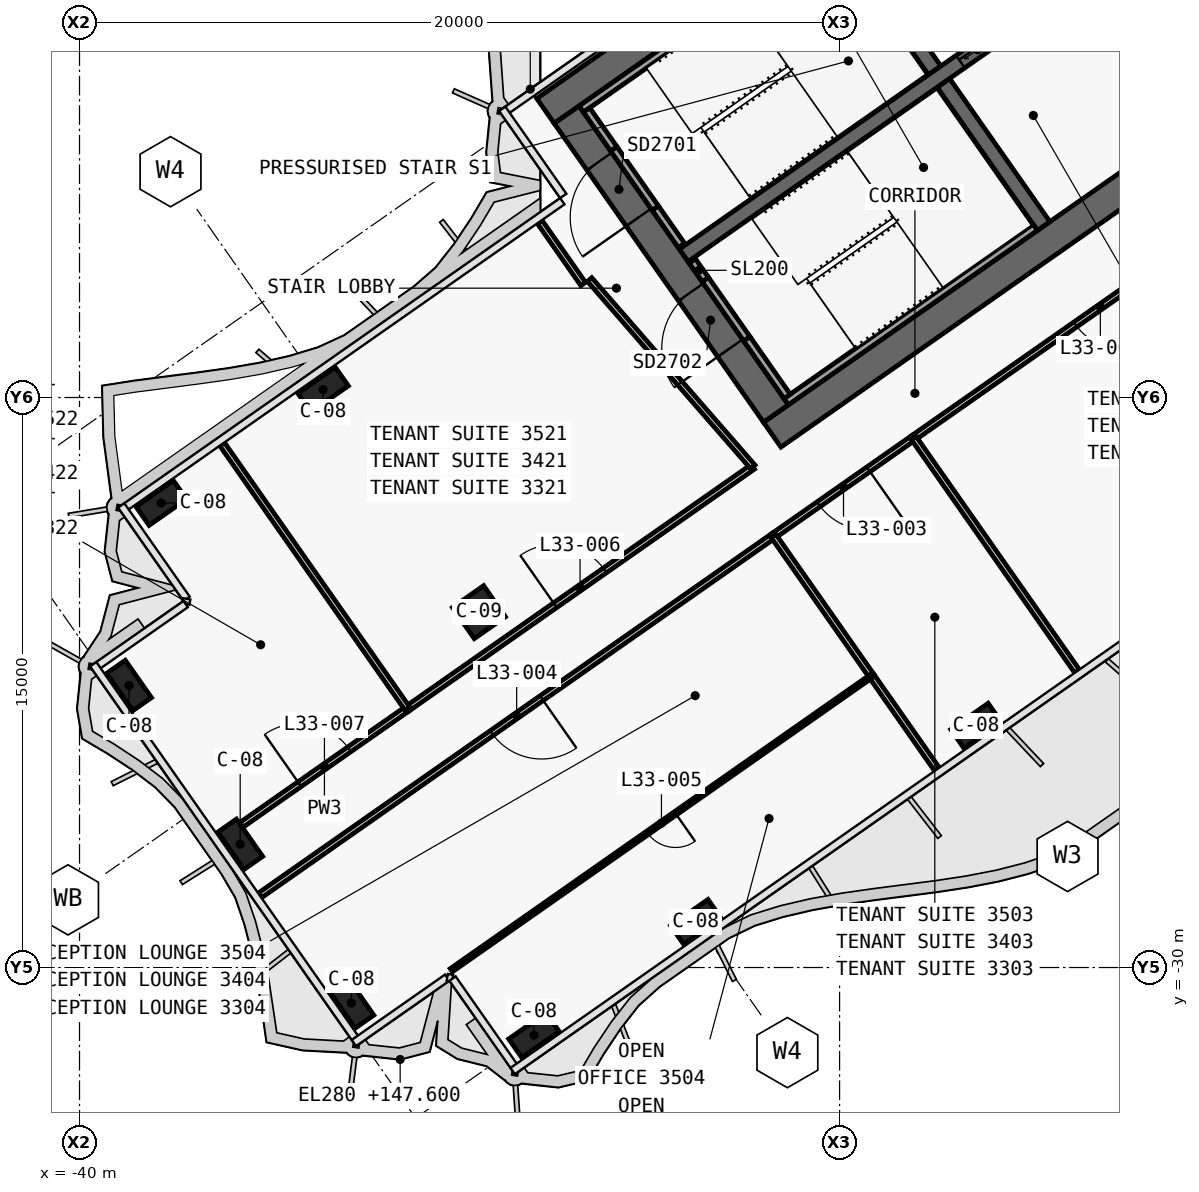
"""IFC4 building model, lengths in metres.
Left out: names, types, materials, properties, quantities, classifications, styles, units other than length and angle.
Written with IfcOpenShell. Run it as: python <this file> out.ifc"""

import sys

from ifc_helpers import new_model, si_unit, direction, frame, frame_2d, origin, origin_2d, place, context, subcontext, project, spatial, polyline, rectangle, outline, extrude, element, fill, save


model = new_model("IFC4")
c1 = context("Model", 3, precision=1e-05, world=origin(), true_north=direction((0.0, 1.0)))
c2 = subcontext(c1, "Body", "Model", "MODEL_VIEW")
j1 = project(units=[si_unit("LENGTHUNIT", "METRE"), si_unit("PLANEANGLEUNIT", "RADIAN")], contexts=[c1])
p1 = place(None, origin())
s1 = spatial("IfcSite", under=j1, at=p1, CompositionType="ELEMENT")
p2 = place(p1, origin())
s2 = spatial("IfcBuilding", under=s1, at=p2, CompositionType="ELEMENT")
p3 = place(p2, frame((0.0, 0.0, 147.6)))
s3 = spatial("IfcBuildingStorey", under=s2, at=p3, CompositionType="ELEMENT", Elevation=147.6)
p4 = place(p3, frame((0.029, 11.984, 0.0), z_axis=(0.0, 0.0, 1.0), x_axis=(-0.819151382952, -0.573577380837, 0.0)))
e1 = element("IfcWall", 1, at=p4, inside=s3, PredefinedType="SHEAR", context=c2, shape_type="SweptSolid", body=[
    extrude(outline(polyline([(33.898, 0.4), (0.56, 0.4), (-0.0, -0.4), (33.898, -0.4), (33.898, 0.4)])), origin(), (0.0, 0.0, 1.0), 3.9),
])
p5 = place(p3, frame((0.029, -0.712, 0.0), z_axis=(0.0, 0.0, 1.0), x_axis=(-0.819151758019, -0.573576845187, 0.0)))
e2 = element("IfcWall", 2, at=p5, inside=s3, PredefinedType="SHEAR", context=c2, shape_type="SweptSolid", body=[
    extrude(outline(polyline([(26.616, 0.4), (0.56, 0.4), (-0.0, -0.4), (26.616, -0.4), (26.616, 0.4)])), origin(), (0.0, 0.0, 1.0), 3.9),
])
p6 = place(p5, frame((2.966, 0.0, 0.0)))
e3 = element("IfcOpeningElement", 3, at=p6, cuts=e2, PredefinedType="OPENING", context=c2, shape_type="SweptSolid", body=[
    extrude(rectangle(XDim=2.4, YDim=2.1, at=frame_2d((1.2, 1.05))), frame((0.0, 0.41, 0.0), z_axis=(0.0, -1.0, 0.0), x_axis=(1.0, 0.0, 0.0)), (0.0, 0.0, 1.0), 0.82),
])
p7 = place(p5, frame((11.916, 0.0, 0.0)))
e4 = element("IfcOpeningElement", 4, at=p7, cuts=e2, PredefinedType="OPENING", context=c2, shape_type="SweptSolid", body=[
    extrude(rectangle(XDim=2.4, YDim=2.1, at=frame_2d((1.2, 1.05))), frame((0.0, 0.41, 0.0), z_axis=(0.0, -1.0, 0.0), x_axis=(1.0, 0.0, 0.0)), (0.0, 0.0, 1.0), 0.82),
])
p8 = place(p3, frame((-21.675, -15.421, 0.0), z_axis=(0.0, 0.0, 1.0), x_axis=(-0.573581815061, 0.819148278049, 0.0)))
e5 = element("IfcWall", 5, at=p8, inside=s3, PredefinedType="SHEAR", context=c2, shape_type="SweptSolid", body=[
    extrude(outline(polyline([(0.0, 0.4), (0.0, -0.4), (9.6, -0.4), (9.6, 0.4), (0.0, 0.4)])), origin(), (0.0, 0.0, 1.0), 3.9),
])
p9 = place(p8, frame((6.3, 0.0, 0.0)))
e6 = element("IfcOpeningElement", 6, at=p9, cuts=e5, PredefinedType="OPENING", context=c2, shape_type="SweptSolid", body=[
    extrude(rectangle(XDim=1.8, YDim=2.1, at=frame_2d((0.9, 1.05))), frame((0.0, 0.41, 0.0), z_axis=(0.0, -1.0, 0.0), x_axis=(1.0, 0.0, 0.0)), (0.0, 0.0, 1.0), 0.82),
])
p10 = place(p8, frame((2.1, 0.0, 0.0)))
e7 = element("IfcOpeningElement", 7, at=p10, cuts=e5, PredefinedType="OPENING", context=c2, shape_type="SweptSolid", body=[
    extrude(rectangle(XDim=1.8, YDim=2.1, at=frame_2d((0.9, 1.05))), frame((0.0, 0.41, 0.0), z_axis=(0.0, -1.0, 0.0), x_axis=(1.0, 0.0, 0.0)), (0.0, 0.0, 1.0), 0.82),
])
p11 = place(p3, frame((-14.63, -10.488, 0.0), z_axis=(0.0, 0.0, 1.0), x_axis=(-0.573611936273, 0.819127185829, 0.0)))
e8 = element("IfcWall", 8, at=p11, inside=s3, PredefinedType="SHEAR", context=c2, shape_type="SweptSolid", body=[
    extrude(outline(polyline([(4.6, 0.2), (0.0, 0.2), (0.0, -0.2), (4.6, -0.2), (4.6, 0.2)])), origin(), (0.0, 0.0, 1.0), 3.9),
])
p12 = place(p3, frame((-17.498, -6.392, 0.0), z_axis=(0.0, 0.0, 1.0), x_axis=(-0.573611936273, 0.819127185829, 0.0)))
e9 = element("IfcWall", 9, at=p12, inside=s3, PredefinedType="SHEAR", context=c2, shape_type="SweptSolid", body=[
    extrude(outline(polyline([(4.6, -0.2), (4.6, 0.2), (0.0, 0.2), (0.0, -0.2), (4.6, -0.2)])), origin(), (0.0, 0.0, 1.0), 3.9),
])
p13 = place(p3, frame((-2.638, 3.768, 0.0), z_axis=(0.0, 0.0, 1.0), x_axis=(-0.81915267502, -0.573575535572, 0.0)))
e10 = element("IfcWall", 10, at=p13, inside=s3, PredefinedType="SHEAR", context=c2, shape_type="SweptSolid", body=[
    extrude(outline(polyline([(26.2, 0.2), (0.0, 0.2), (0.0, -0.2), (26.2, -0.2), (26.2, 0.2)])), origin(), (0.0, 0.0, 1.0), 3.9),
])
p14 = place(p13, frame((1.169, 0.0, 0.0)))
e11 = element("IfcOpeningElement", 11, at=p14, cuts=e10, PredefinedType="OPENING", context=c2, shape_type="SweptSolid", body=[
    extrude(rectangle(XDim=1.1, YDim=2.1, at=frame_2d((0.55, 1.05))), frame((0.0, 0.21, 0.0), z_axis=(0.0, -1.0, 0.0), x_axis=(1.0, 0.0, 0.0)), (0.0, 0.0, 1.0), 0.42),
])
p15 = place(p13, frame((3.206, 0.0, 0.0)))
e12 = element("IfcOpeningElement", 12, at=p15, cuts=e10, PredefinedType="OPENING", context=c2, shape_type="SweptSolid", body=[
    extrude(rectangle(XDim=1.1, YDim=2.1, at=frame_2d((0.55, 1.05))), frame((0.0, 0.21, 0.0), z_axis=(0.0, -1.0, 0.0), x_axis=(1.0, 0.0, 0.0)), (0.0, 0.0, 1.0), 0.42),
])
p16 = place(p13, frame((5.244, 0.0, 0.0)))
e13 = element("IfcOpeningElement", 13, at=p16, cuts=e10, PredefinedType="OPENING", context=c2, shape_type="SweptSolid", body=[
    extrude(rectangle(XDim=1.1, YDim=2.1, at=frame_2d((0.55, 1.05))), frame((0.0, 0.21, 0.0), z_axis=(0.0, -1.0, 0.0), x_axis=(1.0, 0.0, 0.0)), (0.0, 0.0, 1.0), 0.42),
])
p17 = place(p13, frame((7.281, 0.0, 0.0)))
e14 = element("IfcOpeningElement", 14, at=p17, cuts=e10, PredefinedType="OPENING", context=c2, shape_type="SweptSolid", body=[
    extrude(rectangle(XDim=1.1, YDim=2.1, at=frame_2d((0.55, 1.05))), frame((0.0, 0.21, 0.0), z_axis=(0.0, -1.0, 0.0), x_axis=(1.0, 0.0, 0.0)), (0.0, 0.0, 1.0), 0.42),
])
p18 = place(p13, frame((9.688, 0.0, 0.0)))
e15 = element("IfcOpeningElement", 15, at=p18, cuts=e10, PredefinedType="OPENING", context=c2, shape_type="SweptSolid", body=[
    extrude(rectangle(XDim=1.1, YDim=2.1, at=frame_2d((0.55, 1.05))), frame((0.0, 0.21, 0.0), z_axis=(0.0, -1.0, 0.0), x_axis=(1.0, 0.0, 0.0)), (0.0, 0.0, 1.0), 0.42),
])
p19 = place(p13, frame((11.863, 0.0, 0.0)))
e16 = element("IfcOpeningElement", 16, at=p19, cuts=e10, PredefinedType="OPENING", context=c2, shape_type="SweptSolid", body=[
    extrude(rectangle(XDim=1.1, YDim=2.1, at=frame_2d((0.55, 1.05))), frame((0.0, 0.21, 0.0), z_axis=(0.0, -1.0, 0.0), x_axis=(1.0, 0.0, 0.0)), (0.0, 0.0, 1.0), 0.42),
])
p20 = place(p13, frame((14.038, 0.0, 0.0)))
e17 = element("IfcOpeningElement", 17, at=p20, cuts=e10, PredefinedType="OPENING", context=c2, shape_type="SweptSolid", body=[
    extrude(rectangle(XDim=1.1, YDim=2.1, at=frame_2d((0.55, 1.05))), frame((0.0, 0.21, 0.0), z_axis=(0.0, -1.0, 0.0), x_axis=(1.0, 0.0, 0.0)), (0.0, 0.0, 1.0), 0.42),
])
p21 = place(p13, frame((16.212, 0.0, 0.0)))
e18 = element("IfcOpeningElement", 18, at=p21, cuts=e10, PredefinedType="OPENING", context=c2, shape_type="SweptSolid", body=[
    extrude(rectangle(XDim=1.1, YDim=2.1, at=frame_2d((0.55, 1.05))), frame((0.0, 0.21, 0.0), z_axis=(0.0, -1.0, 0.0), x_axis=(1.0, 0.0, 0.0)), (0.0, 0.0, 1.0), 0.42),
])
for number, where, z_axis, x_axis in (
    (19, (-16.41, -23.637, 0.0), (0.0, 0.0, 1.0), (-0.819, -0.574, 0.0)),
    (20, (-23.782, -28.799, 0.0), (0.0, 0.0, 1.0), (-0.819, -0.574, 0.0)),
    (21, (-28.042, -31.782, 0.0), (0.0, 0.0, 1.0), (-0.819, -0.574, 0.0)),
    (22, (-33.591, -14.792, 0.0), (0.0, 0.0, 1.0), (-0.819, -0.574, 0.0)),
    (23, (-37.85, -17.774, 0.0), (0.0, 0.0, 1.0), (-0.819, -0.574, 0.0)),
    (24, (-32.847, -30.935, 0.0), (0.0, 0.0, 1.0), (-0.574, 0.819, 0.0)),
    (25, (-35.772, -26.757, 0.0), (0.0, 0.0, 1.0), (-0.574, 0.819, 0.0)),
    (26, (-38.698, -22.579, 0.0), (0.0, 0.0, 1.0), (-0.574, 0.819, 0.0)),
):
    element("IfcColumn", number, at=place(p3, frame(where, z_axis=z_axis, x_axis=x_axis)), inside=s3, PredefinedType="COLUMN", context=c2, shape_type="SweptSolid", body=[
        extrude(rectangle(XDim=1.2, YDim=0.6, at=origin_2d()), origin(), (0.0, 0.0, 1.0), 3.9),
    ])
p22 = place(p3, frame((-29.49, -20.649, 0.0), z_axis=(0.0, 0.0, 1.0), x_axis=(-0.819152044289, -0.573576436351, 0.0)))
e27 = element("IfcColumn", 27, at=p22, inside=s3, PredefinedType="COLUMN", context=c2, shape_type="SweptSolid", body=[
    extrude(rectangle(XDim=1.0, YDim=1.0, at=origin_2d()), origin(), (0.0, 0.0, 1.0), 3.9),
])
p23 = place(p3, frame((-20.243, -2.821, 0.0), z_axis=(0.0, 0.0, 1.0), x_axis=(-0.819141584393, -0.57359137434, 0.0)))
e28 = element("IfcWall", 28, at=p23, inside=s3, PredefinedType="SOLIDWALL", context=c2, shape_type="SweptSolid", body=[
    extrude(rectangle(XDim=8.0, YDim=0.2, at=frame_2d((4.0, 0.0))), origin(), (0.0, 0.0, 1.0), 3.62),
])
p24 = place(p3, frame((-24.162, -10.998, 0.0), z_axis=(0.0, 0.0, 1.0), x_axis=(-0.573612502218, 0.819126789514, 0.0)))
e29 = element("IfcWall", 29, at=p24, inside=s3, PredefinedType="SOLIDWALL", context=c2, shape_type="SweptSolid", body=[
    extrude(rectangle(XDim=1.2, YDim=0.2, at=frame_2d((0.6, 0.0))), origin(), (0.0, 0.0, 1.0), 3.62),
])
p25 = place(p3, frame((-25.94, -8.458, 0.0), z_axis=(0.0, 0.0, 1.0), x_axis=(-0.573619628835, 0.819121798889, 0.0)))
e30 = element("IfcWall", 30, at=p25, inside=s3, PredefinedType="SOLIDWALL", context=c2, shape_type="SweptSolid", body=[
    extrude(rectangle(XDim=1.25, YDim=0.2, at=frame_2d((0.625, 0.0))), origin(), (0.0, 0.0, 1.0), 3.62),
])
p26 = place(p3, frame((-24.85, -10.014, 2.15), z_axis=(0.0, 0.0, 1.0), x_axis=(-0.573505465124, 0.819201734296, 0.0)))
e31 = element("IfcWall", 31, at=p26, inside=s3, PredefinedType="SOLIDWALL", context=c2, shape_type="SweptSolid", body=[
    extrude(rectangle(XDim=1.9, YDim=0.2, at=frame_2d((0.95, 0.0))), origin(), (0.0, 0.0, 1.0), 1.47),
])
p27 = place(p3, frame((-14.851, -10.521, 0.0), z_axis=(0.0, 0.0, 1.0), x_axis=(-0.819141584393, -0.57359137434, 0.0)))
e32 = element("IfcWall", 32, at=p27, inside=s3, PredefinedType="SOLIDWALL", context=c2, shape_type="SweptSolid", body=[
    extrude(rectangle(XDim=8.0, YDim=0.2, at=frame_2d((4.0, 0.0))), origin(), (0.0, 0.0, 1.0), 3.62),
])
p28 = place(p3, frame((-21.38, -14.97, 0.0), z_axis=(0.0, 0.0, 1.0), x_axis=(-0.573559770908, 0.819163713305, 0.0)))
e33 = element("IfcWall", 33, at=p28, inside=s3, PredefinedType="SOLIDWALL", context=c2, shape_type="SweptSolid", body=[
    extrude(rectangle(XDim=1.85, YDim=0.2, at=frame_2d((0.925, 0.0))), origin(), (0.0, 0.0, 1.0), 3.62),
])
p29 = place(p3, frame((-23.531, -11.898, 0.0), z_axis=(0.0, 0.0, 1.0), x_axis=(-0.573708088123, 0.819059844958, 0.0)))
e34 = element("IfcWall", 34, at=p29, inside=s3, PredefinedType="SOLIDWALL", context=c2, shape_type="SweptSolid", body=[
    extrude(rectangle(XDim=0.6, YDim=0.2, at=frame_2d((0.3, 0.0))), origin(), (0.0, 0.0, 1.0), 3.62),
])
p30 = place(p3, frame((-22.441, -13.455, 2.15), z_axis=(0.0, 0.0, 1.0), x_axis=(-0.573591692345, 0.819141361715, 0.0)))
e35 = element("IfcWall", 35, at=p30, inside=s3, PredefinedType="SOLIDWALL", context=c2, shape_type="SweptSolid", body=[
    extrude(rectangle(XDim=1.9, YDim=0.2, at=frame_2d((0.95, 0.0))), origin(), (0.0, 0.0, 1.0), 1.47),
])
p31 = place(p3, frame((-31.375, -23.19, 0.0), z_axis=(0.0, 0.0, 1.0), x_axis=(0.819152339004, 0.573576015455, 0.0)))
e36 = element("IfcWall", 36, at=p31, inside=s3, PredefinedType="PARTITIONING", context=c2, shape_type="SweptSolid", body=[
    extrude(rectangle(XDim=11.099, YDim=0.15, at=frame_2d((5.549, 0.0))), origin(), (0.0, 0.0, 1.0), 3.0),
])
p32 = place(p31, frame((4.75, 0.0, 0.0)))
e37 = element("IfcOpeningElement", 37, at=p32, cuts=e36, PredefinedType="OPENING", context=c2, shape_type="SweptSolid", body=[
    extrude(rectangle(XDim=1.6, YDim=2.1, at=frame_2d((0.8, 1.05))), frame((0.0, 0.085, 0.0), z_axis=(0.0, -1.0, 0.0), x_axis=(1.0, 0.0, 0.0)), (0.0, 0.0, 1.0), 0.17),
])
p33 = place(p3, frame((-35.739, -26.247, 0.0), z_axis=(0.0, 0.0, 1.0), x_axis=(0.819145866886, 0.573585258495, 0.0)))
e38 = element("IfcWall", 38, at=p33, inside=s3, PredefinedType="PARTITIONING", context=c2, shape_type="SweptSolid", body=[
    extrude(rectangle(XDim=5.332, YDim=0.15, at=frame_2d((2.666, 0.0))), origin(), (0.0, 0.0, 1.0), 3.0),
])
p34 = place(p33, frame((1.866, 0.0, 0.0)))
e39 = element("IfcOpeningElement", 39, at=p34, cuts=e38, PredefinedType="OPENING", context=c2, shape_type="SweptSolid", body=[
    extrude(rectangle(XDim=1.6, YDim=2.1, at=frame_2d((0.8, 1.05))), frame((0.0, 0.085, 0.0), z_axis=(0.0, -1.0, 0.0), x_axis=(1.0, 0.0, 0.0)), (0.0, 0.0, 1.0), 0.17),
])
p35 = place(p3, frame((-8.222, -9.175, 0.0), z_axis=(0.0, 0.0, 1.0), x_axis=(-0.819154519377, -0.573572901543, 0.0)))
e40 = element("IfcWall", 40, at=p35, inside=s3, PredefinedType="PARTITIONING", context=c2, shape_type="SweptSolid", body=[
    extrude(rectangle(XDim=12.004, YDim=0.15, at=frame_2d((6.002, 0.0))), origin(), (0.0, 0.0, 1.0), 3.0),
])
p36 = place(p35, frame((5.202, 0.0, 0.0)))
e41 = element("IfcOpeningElement", 41, at=p36, cuts=e40, PredefinedType="OPENING", context=c2, shape_type="SweptSolid", body=[
    extrude(rectangle(XDim=1.6, YDim=2.1, at=frame_2d((0.8, 1.05))), frame((0.0, 0.085, 0.0), z_axis=(0.0, -1.0, 0.0), x_axis=(1.0, 0.0, 0.0)), (0.0, 0.0, 1.0), 0.17),
])
p37 = place(p3, frame((-18.052, -16.058, 0.0), z_axis=(0.0, 0.0, 1.0), x_axis=(-0.819165703328, -0.573556928727, 0.0)))
e42 = element("IfcWall", 42, at=p37, inside=s3, PredefinedType="PARTITIONING", context=c2, shape_type="SweptSolid", body=[
    extrude(rectangle(XDim=4.504, YDim=0.15, at=frame_2d((2.252, 0.0))), origin(), (0.0, 0.0, 1.0), 3.0),
])
p38 = place(p37, frame((1.452, 0.0, 0.0)))
e43 = element("IfcOpeningElement", 43, at=p38, cuts=e42, PredefinedType="OPENING", context=c2, shape_type="SweptSolid", body=[
    extrude(rectangle(XDim=1.6, YDim=2.1, at=frame_2d((0.8, 1.05))), frame((0.0, 0.085, 0.0), z_axis=(0.0, -1.0, 0.0), x_axis=(1.0, 0.0, 0.0)), (0.0, 0.0, 1.0), 0.17),
])
p39 = place(p3, frame((-21.738, -18.639, 0.0), z_axis=(0.0, 0.0, 1.0), x_axis=(-0.819152676681, -0.573575533201, 0.0)))
e44 = element("IfcWall", 44, at=p39, inside=s3, PredefinedType="PARTITIONING", context=c2, shape_type="SweptSolid", body=[
    extrude(rectangle(XDim=16.502, YDim=0.15, at=frame_2d((8.251, 0.0))), origin(), (0.0, 0.0, 1.0), 2.9),
])
p40 = place(p39, frame((7.451, 0.0, 0.0)))
e45 = element("IfcOpeningElement", 45, at=p40, cuts=e44, PredefinedType="OPENING", context=c2, shape_type="SweptSolid", body=[
    extrude(rectangle(XDim=1.6, YDim=2.1, at=frame_2d((0.8, 1.05))), frame((0.0, 0.085, 0.0), z_axis=(0.0, -1.0, 0.0), x_axis=(1.0, 0.0, 0.0)), (0.0, 0.0, 1.0), 0.17),
])
p41 = place(p3, frame((-26.746, -12.014, 0.0), z_axis=(0.0, 0.0, 1.0), x_axis=(-0.573568836472, 0.819157365729, 0.0)))
e46 = element("IfcWall", 46, at=p41, inside=s3, PredefinedType="PARTITIONING", context=c2, shape_type="SweptSolid", body=[
    extrude(rectangle(XDim=2.0, YDim=0.15, at=frame_2d((1.0, 0.0))), origin(), (0.0, 0.0, 1.0), 3.0),
])
p42 = place(p3, frame((-22.284, -16.826, 0.0), z_axis=(0.0, 0.0, 1.0), x_axis=(-0.656758142177, 0.754101281449, 0.0)))
e47 = element("IfcWall", 47, at=p42, inside=s3, PredefinedType="PARTITIONING", context=c2, shape_type="SweptSolid", body=[
    extrude(rectangle(XDim=6.539, YDim=0.15, at=frame_2d((3.269, 0.0))), origin(), (0.0, 0.0, 1.0), 3.0),
])
p43 = place(p3, frame((-31.373, -23.189, 0.0), z_axis=(0.0, 0.0, 1.0), x_axis=(-0.57357799764, 0.819150951061, 0.0)))
e48 = element("IfcWall", 48, at=p43, inside=s3, PredefinedType="PARTITIONING", context=c2, shape_type="SweptSolid", body=[
    extrude(rectangle(XDim=8.5, YDim=0.15, at=frame_2d((4.25, 0.0))), origin(), (0.0, 0.0, 1.0), 2.9),
])
p44 = place(p3, frame((-13.752, -22.203, 0.0), z_axis=(0.0, 0.0, 1.0), x_axis=(-0.573597787563, 0.819137093595, 0.0)))
e49 = element("IfcWall", 49, at=p44, inside=s3, PredefinedType="PARTITIONING", context=c2, shape_type="SweptSolid", body=[
    extrude(rectangle(XDim=7.5, YDim=0.15, at=frame_2d((3.75, 0.0))), origin(), (0.0, 0.0, 1.0), 2.9),
])
p45 = place(p3, frame((-17.438, -24.784, 0.0), z_axis=(0.0, 0.0, 1.0), x_axis=(-0.573555162214, 0.819166940189, 0.0)))
e50 = element("IfcWall", 50, at=p45, inside=s3, PredefinedType="PARTITIONING", context=c2, shape_type="SweptSolid", body=[
    extrude(rectangle(XDim=3.001, YDim=0.15, at=frame_2d((1.5, 0.0))), origin(), (0.0, 0.0, 1.0), 2.9),
])
p46 = place(p3, frame((-19.158, -22.328, 0.0), z_axis=(0.0, 0.0, 1.0), x_axis=(-0.573553333433, 0.819168220641, 0.0)))
e51 = element("IfcWall", 51, at=p46, inside=s3, PredefinedType="PARTITIONING", context=c2, shape_type="SweptSolid", body=[
    extrude(rectangle(XDim=4.502, YDim=0.15, at=frame_2d((2.251, 0.0))), origin(), (0.0, 0.0, 1.0), 3.62),
])
p47 = place(p3, frame((-19.158, -22.328, 0.0), z_axis=(0.0, 0.0, 1.0), x_axis=(-0.819157147957, -0.573569147488, 0.0)))
e52 = element("IfcWall", 52, at=p47, inside=s3, PredefinedType="PARTITIONING", context=c2, shape_type="SweptSolid", body=[
    extrude(rectangle(XDim=13.5, YDim=0.1, at=frame_2d((6.75, 0.0))), origin(), (0.0, 0.0, 1.0), 3.0),
])
p48 = place(p47, frame((6.3, 0.0, 0.0)))
e53 = element("IfcOpeningElement", 53, at=p48, cuts=e52, PredefinedType="OPENING", context=c2, shape_type="SweptSolid", body=[
    extrude(rectangle(XDim=0.9, YDim=2.1, at=frame_2d((0.45, 1.05))), frame((0.0, 0.06, 0.0), z_axis=(0.0, -1.0, 0.0), x_axis=(1.0, 0.0, 0.0)), (0.0, 0.0, 1.0), 0.12),
])
p49 = place(p21, origin())
e54 = element("IfcDoor", 54, at=p49, inside=s3, OperationType="SLIDING_TO_RIGHT", PredefinedType="DOOR", context=c2, shape_type="SweptSolid", body=[
    extrude(rectangle(XDim=1.1, YDim=2.1, at=frame_2d((0.55, 1.05))), frame((0.0, 0.025, 0.0), z_axis=(0.0, -1.0, 0.0), x_axis=(1.0, 0.0, 0.0)), (0.0, 0.0, 1.0), 0.05),
])
fill(e18, e54)
p50 = place(p9, origin())
e55 = element("IfcDoor", 55, at=p50, inside=s3, OperationType="DOUBLE_DOOR_SINGLE_SWING", PredefinedType="DOOR", context=c2, shape_type="SweptSolid", body=[
    extrude(rectangle(XDim=1.8, YDim=2.1, at=frame_2d((0.9, 1.05))), frame((0.0, 0.025, 0.0), z_axis=(0.0, -1.0, 0.0), x_axis=(1.0, 0.0, 0.0)), (0.0, 0.0, 1.0), 0.05),
])
fill(e6, e55)
p51 = place(p10, origin())
e56 = element("IfcDoor", 56, at=p51, inside=s3, OperationType="DOUBLE_DOOR_SINGLE_SWING", PredefinedType="DOOR", context=c2, shape_type="SweptSolid", body=[
    extrude(rectangle(XDim=1.8, YDim=2.1, at=frame_2d((0.9, 1.05))), frame((0.0, 0.025, 0.0), z_axis=(0.0, -1.0, 0.0), x_axis=(1.0, 0.0, 0.0)), (0.0, 0.0, 1.0), 0.05),
])
fill(e7, e56)
p52 = place(p36, origin())
e57 = element("IfcDoor", 57, at=p52, inside=s3, OperationType="DOUBLE_DOOR_SINGLE_SWING", PredefinedType="DOOR", context=c2, shape_type="SweptSolid", body=[
    extrude(rectangle(XDim=1.6, YDim=2.1, at=frame_2d((0.8, 1.05))), frame((0.0, 0.025, 0.0), z_axis=(0.0, -1.0, 0.0), x_axis=(1.0, 0.0, 0.0)), (0.0, 0.0, 1.0), 0.05),
])
fill(e41, e57)
p53 = place(p38, origin())
e58 = element("IfcDoor", 58, at=p53, inside=s3, OperationType="DOUBLE_DOOR_SINGLE_SWING", PredefinedType="DOOR", context=c2, shape_type="SweptSolid", body=[
    extrude(rectangle(XDim=1.6, YDim=2.1, at=frame_2d((0.8, 1.05))), frame((0.0, 0.025, 0.0), z_axis=(0.0, -1.0, 0.0), x_axis=(1.0, 0.0, 0.0)), (0.0, 0.0, 1.0), 0.05),
])
fill(e43, e58)
p54 = place(p40, origin())
e59 = element("IfcDoor", 59, at=p54, inside=s3, OperationType="DOUBLE_DOOR_SINGLE_SWING", PredefinedType="DOOR", context=c2, shape_type="SweptSolid", body=[
    extrude(rectangle(XDim=1.6, YDim=2.1, at=frame_2d((0.8, 1.05))), frame((0.0, 0.025, 0.0), z_axis=(0.0, -1.0, 0.0), x_axis=(1.0, 0.0, 0.0)), (0.0, 0.0, 1.0), 0.05),
])
fill(e45, e59)
p55 = place(p48, origin())
e60 = element("IfcDoor", 60, at=p55, inside=s3, OperationType="SINGLE_SWING_LEFT", PredefinedType="DOOR", context=c2, shape_type="SweptSolid", body=[
    extrude(rectangle(XDim=0.9, YDim=2.1, at=frame_2d((0.45, 1.05))), frame((0.0, 0.025, 0.0), z_axis=(0.0, -1.0, 0.0), x_axis=(1.0, 0.0, 0.0)), (0.0, 0.0, 1.0), 0.05),
])
fill(e53, e60)
p56 = place(p32, origin())
e61 = element("IfcDoor", 61, at=p56, inside=s3, OperationType="DOUBLE_DOOR_SINGLE_SWING", PredefinedType="DOOR", context=c2, shape_type="SweptSolid", body=[
    extrude(rectangle(XDim=1.6, YDim=2.1, at=frame_2d((0.8, 1.05))), frame((0.0, 0.025, 0.0), z_axis=(0.0, -1.0, 0.0), x_axis=(1.0, 0.0, 0.0)), (0.0, 0.0, 1.0), 0.05),
])
fill(e37, e61)
p57 = place(p34, origin())
e62 = element("IfcDoor", 62, at=p57, inside=s3, OperationType="DOUBLE_DOOR_SINGLE_SWING", PredefinedType="DOOR", context=c2, shape_type="SweptSolid", body=[
    extrude(rectangle(XDim=1.6, YDim=2.1, at=frame_2d((0.8, 1.05))), frame((0.0, 0.025, 0.0), z_axis=(0.0, -1.0, 0.0), x_axis=(1.0, 0.0, 0.0)), (0.0, 0.0, 1.0), 0.05),
])
fill(e39, e62)
save(model, sys.argv[1])
